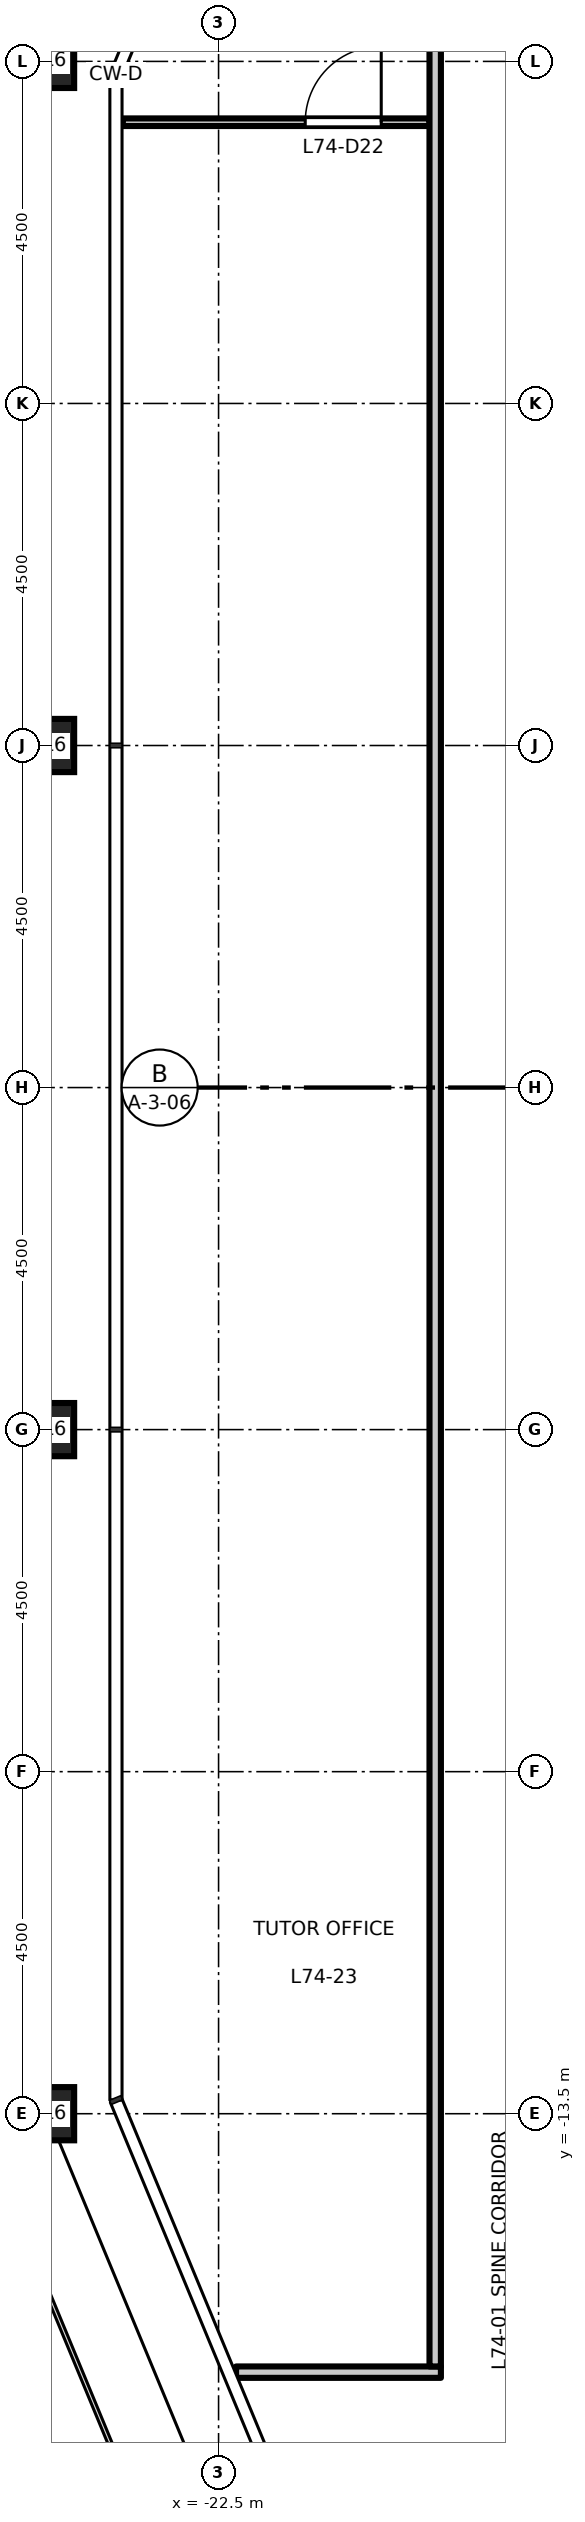
"""IFC4 building model, lengths in metres.
Left out: names, types, materials, properties, quantities, classifications, styles, units other than length and angle.
Written with IfcOpenShell. Run it as: python <this file> out.ifc"""

import sys

from ifc_helpers import new_model, si_unit, direction, frame, frame_2d, origin, origin_2d, place, context, subcontext, project, spatial, rectangle, hollow_rectangle, extrude, element, fill, save


model = new_model("IFC4")
c1 = context("Model", 3, precision=1e-05, world=origin(), true_north=direction((0.0, 1.0)))
c2 = subcontext(c1, "Body", "Model", "MODEL_VIEW")
j1 = project(units=[si_unit("LENGTHUNIT", "METRE"), si_unit("PLANEANGLEUNIT", "RADIAN")], contexts=[c1])
p1 = place(None, origin())
s1 = spatial("IfcSite", under=j1, at=p1, CompositionType="ELEMENT")
p2 = place(p1, origin())
s2 = spatial("IfcBuilding", under=s1, at=p2, CompositionType="ELEMENT")
p3 = place(p2, frame((0.0, 0.0, 343.7)))
s3 = spatial("IfcBuildingStorey", under=s2, at=p3, CompositionType="ELEMENT", Elevation=343.7)
for number, where, z_axis, x_axis in (
    (1, (-24.75, 13.5, 0.0), (0.0, 0.0, 1.0), (1.0, 0.0, 0.0)),
    (2, (-24.75, 4.5, 0.0), (0.0, 0.0, 1.0), (1.0, 0.0, 0.0)),
    (3, (-24.75, -4.5, 0.0), (0.0, 0.0, 1.0), (1.0, 0.0, 0.0)),
    (4, (-24.75, -13.5, 0.0), (0.0, 0.0, 1.0), (1.0, 0.0, 0.0)),
):
    element("IfcColumn", number, at=place(p3, frame(where, z_axis=z_axis, x_axis=x_axis)), inside=s3, PredefinedType="COLUMN", context=c2, shape_type="SweptSolid", body=[
        extrude(hollow_rectangle(XDim=0.7, YDim=0.7, WallThickness=0.036, at=origin_2d()), origin(), (0.0, 0.0, 1.0), 4.5),
    ])
p4 = place(p3, frame((-22.27, -16.9, 0.0), z_axis=(0.0, 0.0, 1.0), x_axis=(1.0, 0.0, 0.0)))
e5 = element("IfcWall", 5, at=p4, inside=s3, PredefinedType="PARTITIONING", context=c2, shape_type="SweptSolid", body=[
    extrude(rectangle(XDim=2.695, YDim=0.15, at=frame_2d((1.348, 0.0))), origin(), (0.0, 0.0, 1.0), 4.3),
])
p5 = place(p3, frame((-23.76, 12.7, 0.0), z_axis=(0.0, 0.0, 1.0), x_axis=(1.0, 0.0, 0.0)))
e6 = element("IfcWall", 6, at=p5, inside=s3, PredefinedType="PARTITIONING", context=c2, shape_type="SweptSolid", body=[
    extrude(rectangle(XDim=4.035, YDim=0.1, at=frame_2d((2.018, 0.0))), origin(), (0.0, 0.0, 1.0), 4.3),
])
p6 = place(p5, frame((2.4, 0.0, 0.0)))
e7 = element("IfcOpeningElement", 7, at=p6, cuts=e6, PredefinedType="OPENING", context=c2, shape_type="SweptSolid", body=[
    extrude(rectangle(XDim=1.0, YDim=2.1, at=frame_2d((0.5, 1.05))), frame((0.0, 0.06, 0.0), z_axis=(0.0, -1.0, 0.0), x_axis=(1.0, 0.0, 0.0)), (0.0, 0.0, 1.0), 0.12),
])
p7 = place(p3, frame((-19.65, -16.825, 0.0), z_axis=(0.0, 0.0, 1.0), x_axis=(0.0, 1.0, 0.0)))
e8 = element("IfcWall", 8, at=p7, inside=s3, PredefinedType="PARTITIONING", context=c2, shape_type="SweptSolid", body=[
    extrude(rectangle(XDim=33.65, YDim=0.15, at=frame_2d((16.825, 0.0))), origin(), (0.0, 0.0, 1.0), 4.3),
])
p8 = place(p7, frame((32.075, 0.0, 0.0)))
e9 = element("IfcOpeningElement", 9, at=p8, cuts=e8, PredefinedType="OPENING", context=c2, shape_type="SweptSolid", body=[
    extrude(rectangle(XDim=1.0, YDim=2.1, at=frame_2d((0.5, 1.05))), frame((0.0, 0.085, 0.0), z_axis=(0.0, -1.0, 0.0), x_axis=(1.0, 0.0, 0.0)), (0.0, 0.0, 1.0), 0.17),
])
p9 = place(p6, origin())
e10 = element("IfcDoor", 10, at=p9, inside=s3, OperationType="SINGLE_SWING_RIGHT", PredefinedType="DOOR", context=c2, shape_type="SweptSolid", body=[
    extrude(rectangle(XDim=1.0, YDim=2.1, at=frame_2d((0.5, 1.05))), frame((0.0, 0.025, 0.0), z_axis=(0.0, -1.0, 0.0), x_axis=(1.0, 0.0, 0.0)), (0.0, 0.0, 1.0), 0.05),
])
fill(e7, e10)
save(model, sys.argv[1])
